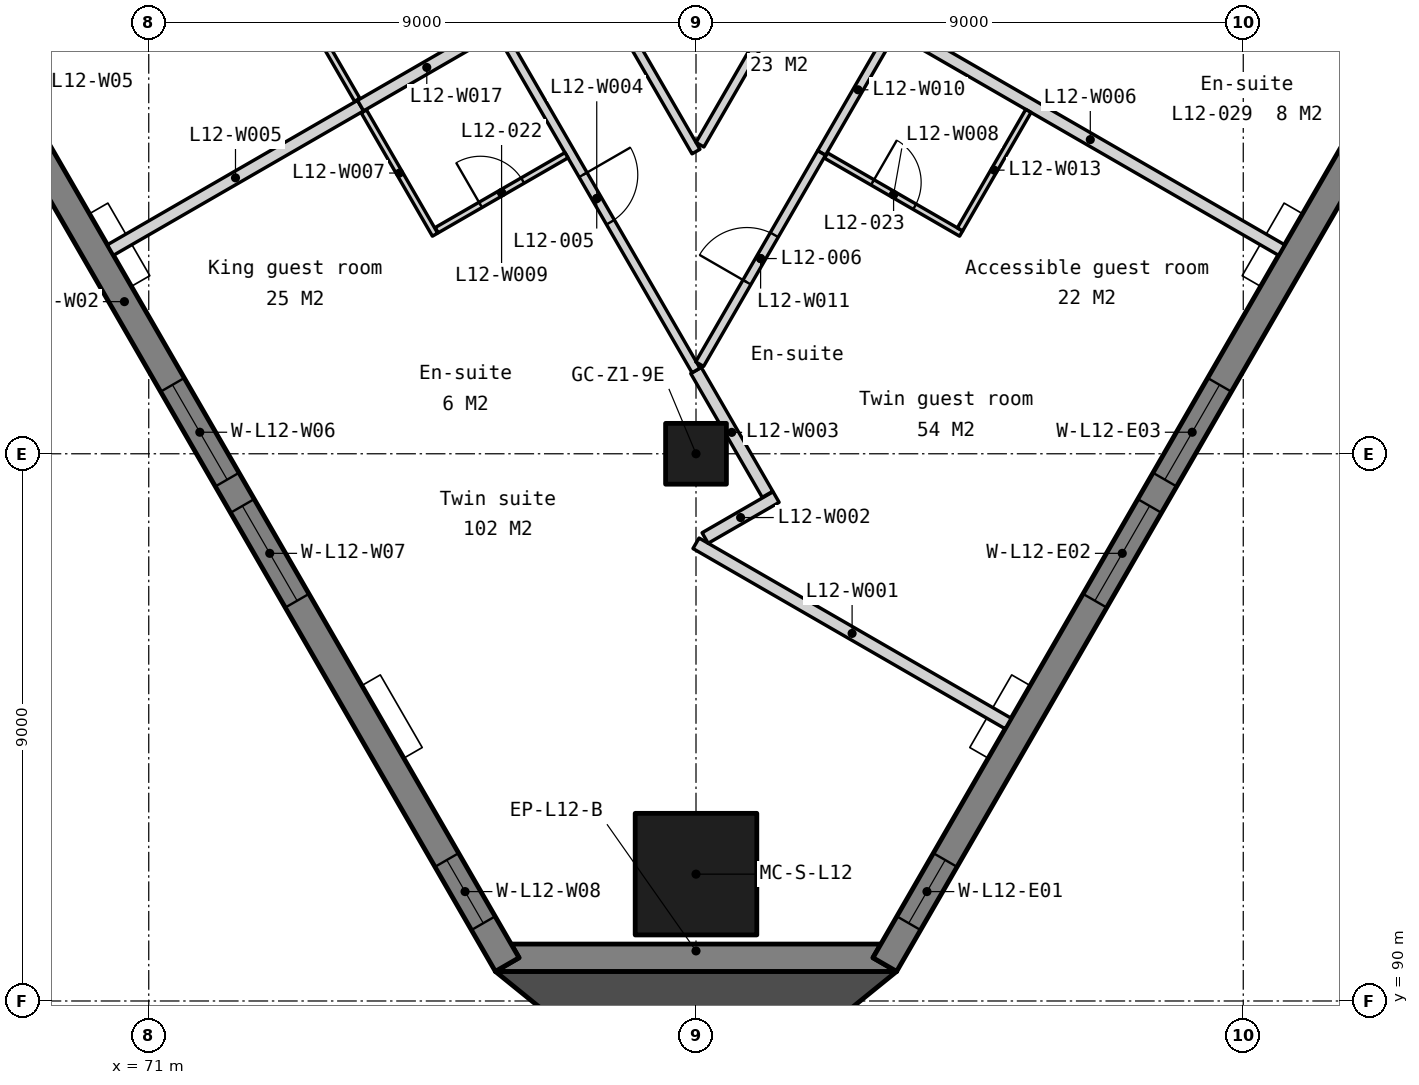
"""IFC4 building model, lengths in metres.
Left out: names, types, materials, properties, quantities, classifications, styles, units other than length and angle.
Written with IfcOpenShell. Run it as: python <this file> out.ifc"""

import sys

from ifc_helpers import new_model, si_unit, direction, frame, frame_2d, origin, origin_2d, place, context, subcontext, project, spatial, polyline, rectangle, outline, extrude, element, fill, save


model = new_model("IFC4")
c1 = context("Model", 3, precision=1e-05, world=origin(), true_north=direction((0.0, 1.0)))
c2 = subcontext(c1, "Body", "Model", "MODEL_VIEW")
j1 = project(units=[si_unit("LENGTHUNIT", "METRE"), si_unit("PLANEANGLEUNIT", "RADIAN")], contexts=[c1])
p1 = place(None, origin())
s1 = spatial("IfcSite", under=j1, at=p1, CompositionType="ELEMENT")
p2 = place(p1, origin())
s2 = spatial("IfcBuilding", under=s1, at=p2, CompositionType="ELEMENT")
p3 = place(p2, frame((0.0, 0.0, 56.0)))
s3 = spatial("IfcBuildingStorey", under=s2, at=p3, CompositionType="ELEMENT", Elevation=56.0)
p4 = place(p3, frame((80.0, 99.0, 0.0), z_axis=(0.0, 0.0, 1.0), x_axis=(1.0, 0.0, 0.0)))
e1 = element("IfcColumn", 1, at=p4, inside=s3, PredefinedType="COLUMN", context=c2, shape_type="SweptSolid", body=[
    extrude(rectangle(XDim=1.0, YDim=1.0, at=origin_2d()), origin(), (0.0, 0.0, 1.0), 3.5),
])
p5 = place(p3, frame((80.0, 92.086, 0.0), z_axis=(0.0, 0.0, 1.0), x_axis=(1.0, 0.0, 0.0)))
e2 = element("IfcColumn", 2, at=p5, inside=s3, PredefinedType="COLUMN", context=c2, shape_type="SweptSolid", body=[
    extrude(rectangle(XDim=2.0, YDim=2.0, at=origin_2d()), origin(), (0.0, 0.0, 1.0), 3.5),
])
p6 = place(p3, frame((0.0, 0.0, -0.15)))
e3 = element("IfcWall", 3, at=p6, inside=s3, PredefinedType="SOLIDWALL", context=c2, shape_type="SweptSolid", body=[
    extrude(outline(polyline([(76.7, 90.486), (77.09, 90.711), (76.96, 90.936), (83.04, 90.936), (82.91, 90.711), (83.3, 90.486), (76.7, 90.486)])), origin(), (0.0, 0.0, 1.0), 3.5),
])
p7 = place(p3, frame((64.305, 112.405, -0.15), z_axis=(0.0, 0.0, 1.0), x_axis=(0.499997464327, -0.866026867751, 0.0)))
e4 = element("IfcWall", 4, at=p7, inside=s3, PredefinedType="SOLIDWALL", context=c2, shape_type="SweptSolid", body=[
    extrude(outline(polyline([(25.18, 3.5), (25.18, 0.0), (0.0, 0.0), (0.0, 3.5), (25.18, 3.5)])), frame((0.0, 0.225, 0.0), z_axis=(0.0, -1.0, 0.0), x_axis=(1.0, 0.0, 0.0)), (0.0, 0.0, 1.0), 0.45),
])
p8 = place(p7, frame((5.21, 0.0, 1.05)))
e5 = element("IfcOpeningElement", 5, at=p8, cuts=e4, PredefinedType="OPENING", context=c2, shape_type="SweptSolid", body=[
    extrude(rectangle(XDim=1.8, YDim=1.5, at=frame_2d((0.9, 0.75))), frame((0.0, 0.235, 0.0), z_axis=(0.0, -1.0, 0.0), x_axis=(1.0, 0.0, 0.0)), (0.0, 0.0, 1.0), 0.47),
])
p9 = place(p7, frame((7.51, 0.0, 1.05)))
e6 = element("IfcOpeningElement", 6, at=p9, cuts=e4, PredefinedType="OPENING", context=c2, shape_type="SweptSolid", body=[
    extrude(rectangle(XDim=1.8, YDim=1.5, at=frame_2d((0.9, 0.75))), frame((0.0, 0.235, 0.0), z_axis=(0.0, -1.0, 0.0), x_axis=(1.0, 0.0, 0.0)), (0.0, 0.0, 1.0), 0.47),
])
p10 = place(p7, frame((14.17, 0.0, 1.05)))
e7 = element("IfcOpeningElement", 7, at=p10, cuts=e4, PredefinedType="OPENING", context=c2, shape_type="SweptSolid", body=[
    extrude(rectangle(XDim=1.8, YDim=1.5, at=frame_2d((0.9, 0.75))), frame((0.0, 0.235, 0.0), z_axis=(0.0, -1.0, 0.0), x_axis=(1.0, 0.0, 0.0)), (0.0, 0.0, 1.0), 0.47),
])
p11 = place(p7, frame((16.47, 0.0, 1.05)))
e8 = element("IfcOpeningElement", 8, at=p11, cuts=e4, PredefinedType="OPENING", context=c2, shape_type="SweptSolid", body=[
    extrude(rectangle(XDim=1.8, YDim=1.5, at=frame_2d((0.9, 0.75))), frame((0.0, 0.235, 0.0), z_axis=(0.0, -1.0, 0.0), x_axis=(1.0, 0.0, 0.0)), (0.0, 0.0, 1.0), 0.47),
])
p12 = place(p7, frame((23.194, 0.0, 1.05)))
e9 = element("IfcOpeningElement", 9, at=p12, cuts=e4, PredefinedType="OPENING", context=c2, shape_type="SweptSolid", body=[
    extrude(rectangle(XDim=1.2, YDim=1.5, at=frame_2d((0.6, 0.75))), frame((0.0, 0.235, 0.0), z_axis=(0.0, -1.0, 0.0), x_axis=(1.0, 0.0, 0.0)), (0.0, 0.0, 1.0), 0.47),
])
p13 = place(p3, frame((83.105, 90.599, -0.15), z_axis=(0.0, 0.0, 1.0), x_axis=(0.499999201451, 0.866025864826, 0.0)))
e10 = element("IfcWall", 10, at=p13, inside=s3, PredefinedType="SOLIDWALL", context=c2, shape_type="SweptSolid", body=[
    extrude(outline(polyline([(44.8, 0.0), (44.8, 3.5), (0.0, 3.5), (0.0, 0.0), (44.8, 0.0)])), frame((0.0, 0.225, 0.0), z_axis=(0.0, -1.0, 0.0), x_axis=(1.0, 0.0, 0.0)), (0.0, 0.0, 1.0), 0.45),
])
p14 = place(p13, frame((0.786, 0.0, 1.05)))
e11 = element("IfcOpeningElement", 11, at=p14, cuts=e10, PredefinedType="OPENING", context=c2, shape_type="SweptSolid", body=[
    extrude(rectangle(XDim=1.2, YDim=1.5, at=frame_2d((0.6, 0.75))), frame((0.0, 0.235, 0.0), z_axis=(0.0, -1.0, 0.0), x_axis=(1.0, 0.0, 0.0)), (0.0, 0.0, 1.0), 0.47),
])
p15 = place(p13, frame((6.91, 0.0, 1.05)))
e12 = element("IfcOpeningElement", 12, at=p15, cuts=e10, PredefinedType="OPENING", context=c2, shape_type="SweptSolid", body=[
    extrude(rectangle(XDim=1.8, YDim=1.5, at=frame_2d((0.9, 0.75))), frame((0.0, 0.235, 0.0), z_axis=(0.0, -1.0, 0.0), x_axis=(1.0, 0.0, 0.0)), (0.0, 0.0, 1.0), 0.47),
])
p16 = place(p13, frame((9.21, 0.0, 1.05)))
e13 = element("IfcOpeningElement", 13, at=p16, cuts=e10, PredefinedType="OPENING", context=c2, shape_type="SweptSolid", body=[
    extrude(rectangle(XDim=1.8, YDim=1.5, at=frame_2d((0.9, 0.75))), frame((0.0, 0.235, 0.0), z_axis=(0.0, -1.0, 0.0), x_axis=(1.0, 0.0, 0.0)), (0.0, 0.0, 1.0), 0.47),
])
p17 = place(p13, frame((15.87, 0.0, 1.05)))
e14 = element("IfcOpeningElement", 14, at=p17, cuts=e10, PredefinedType="OPENING", context=c2, shape_type="SweptSolid", body=[
    extrude(rectangle(XDim=1.8, YDim=1.5, at=frame_2d((0.9, 0.75))), frame((0.0, 0.235, 0.0), z_axis=(0.0, -1.0, 0.0), x_axis=(1.0, 0.0, 0.0)), (0.0, 0.0, 1.0), 0.47),
])
p18 = place(p13, frame((18.17, 0.0, 1.05)))
e15 = element("IfcOpeningElement", 15, at=p18, cuts=e10, PredefinedType="OPENING", context=c2, shape_type="SweptSolid", body=[
    extrude(rectangle(XDim=1.8, YDim=1.5, at=frame_2d((0.9, 0.75))), frame((0.0, 0.235, 0.0), z_axis=(0.0, -1.0, 0.0), x_axis=(1.0, 0.0, 0.0)), (0.0, 0.0, 1.0), 0.47),
])
p19 = place(p13, frame((24.83, 0.0, 1.05)))
e16 = element("IfcOpeningElement", 16, at=p19, cuts=e10, PredefinedType="OPENING", context=c2, shape_type="SweptSolid", body=[
    extrude(rectangle(XDim=1.8, YDim=1.5, at=frame_2d((0.9, 0.75))), frame((0.0, 0.235, 0.0), z_axis=(0.0, -1.0, 0.0), x_axis=(1.0, 0.0, 0.0)), (0.0, 0.0, 1.0), 0.47),
])
p20 = place(p13, frame((27.13, 0.0, 1.05)))
e17 = element("IfcOpeningElement", 17, at=p20, cuts=e10, PredefinedType="OPENING", context=c2, shape_type="SweptSolid", body=[
    extrude(rectangle(XDim=1.8, YDim=1.5, at=frame_2d((0.9, 0.75))), frame((0.0, 0.235, 0.0), z_axis=(0.0, -1.0, 0.0), x_axis=(1.0, 0.0, 0.0)), (0.0, 0.0, 1.0), 0.47),
])
p21 = place(p13, frame((33.79, 0.0, 1.05)))
e18 = element("IfcOpeningElement", 18, at=p21, cuts=e10, PredefinedType="OPENING", context=c2, shape_type="SweptSolid", body=[
    extrude(rectangle(XDim=1.8, YDim=1.5, at=frame_2d((0.9, 0.75))), frame((0.0, 0.235, 0.0), z_axis=(0.0, -1.0, 0.0), x_axis=(1.0, 0.0, 0.0)), (0.0, 0.0, 1.0), 0.47),
])
p22 = place(p13, frame((36.09, 0.0, 1.05)))
e19 = element("IfcOpeningElement", 19, at=p22, cuts=e10, PredefinedType="OPENING", context=c2, shape_type="SweptSolid", body=[
    extrude(rectangle(XDim=1.8, YDim=1.5, at=frame_2d((0.9, 0.75))), frame((0.0, 0.235, 0.0), z_axis=(0.0, -1.0, 0.0), x_axis=(1.0, 0.0, 0.0)), (0.0, 0.0, 1.0), 0.47),
])
p23 = place(p13, frame((42.814, 0.0, 1.05)))
e20 = element("IfcOpeningElement", 20, at=p23, cuts=e10, PredefinedType="OPENING", context=c2, shape_type="SweptSolid", body=[
    extrude(rectangle(XDim=1.2, YDim=1.5, at=frame_2d((0.6, 0.75))), frame((0.0, 0.235, 0.0), z_axis=(0.0, -1.0, 0.0), x_axis=(1.0, 0.0, 0.0)), (0.0, 0.0, 1.0), 0.47),
])
p24 = place(p3, frame((0.0, 0.0, -0.15)))
e21 = element("IfcWall", 21, at=p24, inside=s3, PredefinedType="SOLIDWALL", context=c2, shape_type="SweptSolid", body=[
    extrude(outline(polyline([(76.7, 90.486), (80.0, 87.811), (83.3, 90.486), (76.7, 90.486)])), origin(), (0.0, 0.0, 1.0), 3.5),
])
p25 = place(p3, frame((80.0, 97.528, 0.0), z_axis=(0.0, 0.0, 1.0), x_axis=(0.866019629176, -0.500010001781, 0.0)))
e22 = element("IfcWall", 22, at=p25, inside=s3, PredefinedType="PARTITIONING", context=c2, shape_type="SweptSolid", body=[
    extrude(rectangle(XDim=5.929, YDim=0.2, at=frame_2d((2.964, 0.0))), origin(), (0.0, 0.0, 1.0), 3.35),
])
p26 = place(p3, frame((80.15, 97.614, 0.0), z_axis=(0.0, 0.0, 1.0), x_axis=(0.866049846835, 0.499957661005, 0.0)))
e23 = element("IfcWall", 23, at=p26, inside=s3, PredefinedType="PARTITIONING", context=c2, shape_type="SweptSolid", body=[
    extrude(rectangle(XDim=1.348, YDim=0.2, at=frame_2d((0.674, 0.0))), origin(), (0.0, 0.0, 1.0), 3.35),
])
p27 = place(p3, frame((80.0, 100.371, 0.0), z_axis=(0.0, 0.0, 1.0), x_axis=(0.499812313709, -0.866133737401, 0.0)))
e24 = element("IfcWall", 24, at=p27, inside=s3, PredefinedType="PARTITIONING", context=c2, shape_type="SweptSolid", body=[
    extrude(rectangle(XDim=2.352, YDim=0.2, at=frame_2d((1.176, 0.0))), origin(), (0.0, 0.0, 1.0), 3.35),
])
p28 = place(p3, frame((76.735, 106.026, 0.0), z_axis=(0.0, 0.0, 1.0), x_axis=(0.499995393218, -0.866028063495, 0.0)))
e25 = element("IfcWall", 25, at=p28, inside=s3, PredefinedType="PARTITIONING", context=c2, shape_type="SweptSolid", body=[
    extrude(rectangle(XDim=6.53, YDim=0.15, at=frame_2d((3.265, 0.0))), origin(), (0.0, 0.0, 1.0), 3.35),
])
p29 = place(p28, frame((2.815, 0.0, 0.0)))
e26 = element("IfcOpeningElement", 26, at=p29, cuts=e25, PredefinedType="OPENING", context=c2, shape_type="SweptSolid", body=[
    extrude(rectangle(XDim=0.9, YDim=2.1, at=frame_2d((0.45, 1.05))), frame((0.0, 0.085, 0.0), z_axis=(0.0, -1.0, 0.0), x_axis=(1.0, 0.0, 0.0)), (0.0, 0.0, 1.0), 0.17),
])
p30 = place(p3, frame((70.37, 102.351, 0.0), z_axis=(0.0, 0.0, 1.0), x_axis=(0.866033238375, 0.499986429846, 0.0)))
e27 = element("IfcWall", 27, at=p30, inside=s3, PredefinedType="PARTITIONING", context=c2, shape_type="SweptSolid", body=[
    extrude(rectangle(XDim=4.75, YDim=0.2, at=frame_2d((2.375, 0.0))), origin(), (0.0, 0.0, 1.0), 3.35),
])
p31 = place(p3, frame((83.339, 105.983, 0.0), z_axis=(0.0, 0.0, 1.0), x_axis=(0.866023858256, -0.500002676924, 0.0)))
e28 = element("IfcWall", 28, at=p31, inside=s3, PredefinedType="PARTITIONING", context=c2, shape_type="SweptSolid", body=[
    extrude(rectangle(XDim=7.265, YDim=0.2, at=frame_2d((3.633, 0.0))), origin(), (0.0, 0.0, 1.0), 3.35),
])
p32 = place(p3, frame((74.538, 104.63, 0.0), z_axis=(0.0, 0.0, 1.0), x_axis=(0.499999433879, -0.866025730634, 0.0)))
e29 = element("IfcWall", 29, at=p32, inside=s3, PredefinedType="PARTITIONING", context=c2, shape_type="SweptSolid", body=[
    extrude(rectangle(XDim=2.34, YDim=0.1, at=frame_2d((1.17, 0.0))), origin(), (0.0, 0.0, 1.0), 3.35),
])
p33 = place(p3, frame((82.139, 103.905, 0.0), z_axis=(0.0, 0.0, 1.0), x_axis=(0.866014388206, -0.500019079056, 0.0)))
e30 = element("IfcWall", 30, at=p33, inside=s3, PredefinedType="PARTITIONING", context=c2, shape_type="SweptSolid", body=[
    extrude(rectangle(XDim=2.565, YDim=0.1, at=frame_2d((1.282, 0.0))), origin(), (0.0, 0.0, 1.0), 3.35),
])
p34 = place(p33, frame((0.883, 0.0, 0.0)))
e31 = element("IfcOpeningElement", 31, at=p34, cuts=e30, PredefinedType="OPENING", context=c2, shape_type="SweptSolid", body=[
    extrude(rectangle(XDim=0.8, YDim=2.1, at=frame_2d((0.4, 1.05))), frame((0.0, 0.06, 0.0), z_axis=(0.0, -1.0, 0.0), x_axis=(1.0, 0.0, 0.0)), (0.0, 0.0, 1.0), 0.12),
])
p35 = place(p3, frame((75.735, 102.677, 0.0), z_axis=(0.0, 0.0, 1.0), x_axis=(0.866040446274, 0.499973944738, 0.0)))
e32 = element("IfcWall", 32, at=p35, inside=s3, PredefinedType="PARTITIONING", context=c2, shape_type="SweptSolid", body=[
    extrude(rectangle(XDim=2.465, YDim=0.1, at=frame_2d((1.232, 0.0))), origin(), (0.0, 0.0, 1.0), 3.35),
])
p36 = place(p35, frame((0.833, 0.0, 0.0)))
e33 = element("IfcOpeningElement", 33, at=p36, cuts=e32, PredefinedType="OPENING", context=c2, shape_type="SweptSolid", body=[
    extrude(rectangle(XDim=0.8, YDim=2.1, at=frame_2d((0.4, 1.05))), frame((0.0, 0.06, 0.0), z_axis=(0.0, -1.0, 0.0), x_axis=(1.0, 0.0, 0.0)), (0.0, 0.0, 1.0), 0.12),
])
p37 = place(p3, frame((82.065, 103.947, 0.0), z_axis=(0.0, 0.0, 1.0), x_axis=(0.500001309137, 0.866024647952, 0.0)))
e34 = element("IfcWall", 34, at=p37, inside=s3, PredefinedType="PARTITIONING", context=c2, shape_type="SweptSolid", body=[
    extrude(rectangle(XDim=2.4, YDim=0.15, at=frame_2d((1.2, 0.0))), origin(), (0.0, 0.0, 1.0), 3.35),
])
p38 = place(p3, frame((80.06, 100.474, 0.0), z_axis=(0.0, 0.0, 1.0), x_axis=(0.499963124258, 0.866046692957, 0.0)))
e35 = element("IfcWall", 35, at=p38, inside=s3, PredefinedType="PARTITIONING", context=c2, shape_type="SweptSolid", body=[
    extrude(rectangle(XDim=4.01, YDim=0.15, at=frame_2d((2.005, 0.0))), origin(), (0.0, 0.0, 1.0), 3.35),
])
p39 = place(p38, frame((1.555, 0.0, 0.0)))
e36 = element("IfcOpeningElement", 36, at=p39, cuts=e35, PredefinedType="OPENING", context=c2, shape_type="SweptSolid", body=[
    extrude(rectangle(XDim=0.9, YDim=2.1, at=frame_2d((0.45, 1.05))), frame((0.0, 0.085, 0.0), z_axis=(0.0, -1.0, 0.0), x_axis=(1.0, 0.0, 0.0)), (0.0, 0.0, 1.0), 0.17),
])
p40 = place(p3, frame((73.258, 106.847, 0.0), z_axis=(0.0, 0.0, 1.0), x_axis=(0.499999433879, -0.866025730634, 0.0)))
e37 = element("IfcWall", 37, at=p40, inside=s3, PredefinedType="PARTITIONING", context=c2, shape_type="SweptSolid", body=[
    extrude(rectangle(XDim=2.34, YDim=0.1, at=frame_2d((1.17, 0.0))), origin(), (0.0, 0.0, 1.0), 3.35),
])
p41 = place(p3, frame((84.342, 102.69, 0.0), z_axis=(0.0, 0.0, 1.0), x_axis=(0.499966648284, 0.866044658551, 0.0)))
e38 = element("IfcWall", 38, at=p41, inside=s3, PredefinedType="PARTITIONING", context=c2, shape_type="SweptSolid", body=[
    extrude(rectangle(XDim=2.25, YDim=0.1, at=frame_2d((1.125, 0.0))), origin(), (0.0, 0.0, 1.0), 3.35),
])
p42 = place(p3, frame((74.483, 104.726, 0.0), z_axis=(0.0, 0.0, 1.0), x_axis=(0.866006140796, 0.500033362991, 0.0)))
e39 = element("IfcWall", 39, at=p42, inside=s3, PredefinedType="PARTITIONING", context=c2, shape_type="SweptSolid", body=[
    extrude(rectangle(XDim=2.515, YDim=0.2, at=frame_2d((1.257, 0.0))), origin(), (0.0, 0.0, 1.0), 3.35),
])
p43 = place(p3, frame((76.961, 109.234, 0.0), z_axis=(0.0, 0.0, 1.0), x_axis=(0.499984420002, -0.866034398714, 0.0)))
e40 = element("IfcWall", 40, at=p43, inside=s3, PredefinedType="PARTITIONING", context=c2, shape_type="SweptSolid", body=[
    extrude(rectangle(XDim=6.077, YDim=0.15, at=frame_2d((3.039, 0.0))), origin(), (0.0, 0.0, 1.0), 3.35),
])
p44 = place(p3, frame((80.065, 104.083, 0.0), z_axis=(0.0, 0.0, 1.0), x_axis=(0.49999109456, 0.866030545282, 0.0)))
e41 = element("IfcWall", 41, at=p44, inside=s3, PredefinedType="PARTITIONING", context=c2, shape_type="SweptSolid", body=[
    extrude(rectangle(XDim=8.391, YDim=0.15, at=frame_2d((4.196, 0.0))), origin(), (0.0, 0.0, 1.0), 3.35),
])
p45 = place(p44, frame((3.746, 0.0, 0.0)))
e42 = element("IfcOpeningElement", 42, at=p45, cuts=e41, PredefinedType="OPENING", context=c2, shape_type="SweptSolid", body=[
    extrude(rectangle(XDim=0.9, YDim=2.1, at=frame_2d((0.45, 1.05))), frame((0.0, 0.085, 0.0), z_axis=(0.0, -1.0, 0.0), x_axis=(1.0, 0.0, 0.0)), (0.0, 0.0, 1.0), 0.17),
])
p46 = place(p10, origin())
e43 = element("IfcWindow", 43, at=p46, inside=s3, PartitioningType="SINGLE_PANEL", PredefinedType="WINDOW", context=c2, shape_type="SweptSolid", body=[
    extrude(rectangle(XDim=1.8, YDim=1.5, at=frame_2d((0.9, 0.75))), frame((0.0, 0.03, 0.0), z_axis=(0.0, -1.0, 0.0), x_axis=(1.0, 0.0, 0.0)), (0.0, 0.0, 1.0), 0.06),
])
fill(e7, e43)
p47 = place(p11, origin())
e44 = element("IfcWindow", 44, at=p47, inside=s3, PartitioningType="SINGLE_PANEL", PredefinedType="WINDOW", context=c2, shape_type="SweptSolid", body=[
    extrude(rectangle(XDim=1.8, YDim=1.5, at=frame_2d((0.9, 0.75))), frame((0.0, 0.03, 0.0), z_axis=(0.0, -1.0, 0.0), x_axis=(1.0, 0.0, 0.0)), (0.0, 0.0, 1.0), 0.06),
])
fill(e8, e44)
p48 = place(p12, origin())
e45 = element("IfcWindow", 45, at=p48, inside=s3, PartitioningType="SINGLE_PANEL", PredefinedType="WINDOW", context=c2, shape_type="SweptSolid", body=[
    extrude(rectangle(XDim=1.2, YDim=1.5, at=frame_2d((0.6, 0.75))), frame((0.0, 0.03, 0.0), z_axis=(0.0, -1.0, 0.0), x_axis=(1.0, 0.0, 0.0)), (0.0, 0.0, 1.0), 0.06),
])
fill(e9, e45)
p49 = place(p14, origin())
e46 = element("IfcWindow", 46, at=p49, inside=s3, PartitioningType="SINGLE_PANEL", PredefinedType="WINDOW", context=c2, shape_type="SweptSolid", body=[
    extrude(rectangle(XDim=1.2, YDim=1.5, at=frame_2d((0.6, 0.75))), frame((0.0, 0.03, 0.0), z_axis=(0.0, -1.0, 0.0), x_axis=(1.0, 0.0, 0.0)), (0.0, 0.0, 1.0), 0.06),
])
fill(e11, e46)
p50 = place(p15, origin())
e47 = element("IfcWindow", 47, at=p50, inside=s3, PartitioningType="SINGLE_PANEL", PredefinedType="WINDOW", context=c2, shape_type="SweptSolid", body=[
    extrude(rectangle(XDim=1.8, YDim=1.5, at=frame_2d((0.9, 0.75))), frame((0.0, 0.03, 0.0), z_axis=(0.0, -1.0, 0.0), x_axis=(1.0, 0.0, 0.0)), (0.0, 0.0, 1.0), 0.06),
])
fill(e12, e47)
p51 = place(p16, origin())
e48 = element("IfcWindow", 48, at=p51, inside=s3, PartitioningType="SINGLE_PANEL", PredefinedType="WINDOW", context=c2, shape_type="SweptSolid", body=[
    extrude(rectangle(XDim=1.8, YDim=1.5, at=frame_2d((0.9, 0.75))), frame((0.0, 0.03, 0.0), z_axis=(0.0, -1.0, 0.0), x_axis=(1.0, 0.0, 0.0)), (0.0, 0.0, 1.0), 0.06),
])
fill(e13, e48)
p52 = place(p29, origin())
e49 = element("IfcDoor", 49, at=p52, inside=s3, OperationType="SINGLE_SWING_LEFT", PredefinedType="DOOR", context=c2, shape_type="SweptSolid", body=[
    extrude(rectangle(XDim=0.9, YDim=2.1, at=frame_2d((0.45, 1.05))), frame((0.0, 0.025, 0.0), z_axis=(0.0, -1.0, 0.0), x_axis=(1.0, 0.0, 0.0)), (0.0, 0.0, 1.0), 0.05),
])
fill(e26, e49)
p53 = place(p39, origin())
e50 = element("IfcDoor", 50, at=p53, inside=s3, OperationType="SINGLE_SWING_LEFT", PredefinedType="DOOR", context=c2, shape_type="SweptSolid", body=[
    extrude(rectangle(XDim=0.9, YDim=2.1, at=frame_2d((0.45, 1.05))), frame((0.0, 0.025, 0.0), z_axis=(0.0, -1.0, 0.0), x_axis=(1.0, 0.0, 0.0)), (0.0, 0.0, 1.0), 0.05),
])
fill(e36, e50)
p54 = place(p36, origin())
e51 = element("IfcDoor", 51, at=p54, inside=s3, OperationType="SINGLE_SWING_LEFT", PredefinedType="DOOR", context=c2, shape_type="SweptSolid", body=[
    extrude(rectangle(XDim=0.8, YDim=2.1, at=frame_2d((0.4, 1.05))), frame((0.0, 0.025, 0.0), z_axis=(0.0, -1.0, 0.0), x_axis=(1.0, 0.0, 0.0)), (0.0, 0.0, 1.0), 0.05),
])
fill(e33, e51)
p55 = place(p34, origin())
e52 = element("IfcDoor", 52, at=p55, inside=s3, OperationType="SINGLE_SWING_LEFT", PredefinedType="DOOR", context=c2, shape_type="SweptSolid", body=[
    extrude(rectangle(XDim=0.8, YDim=2.1, at=frame_2d((0.4, 1.05))), frame((0.0, 0.025, 0.0), z_axis=(0.0, -1.0, 0.0), x_axis=(1.0, 0.0, 0.0)), (0.0, 0.0, 1.0), 0.05),
])
fill(e31, e52)
save(model, sys.argv[1])
